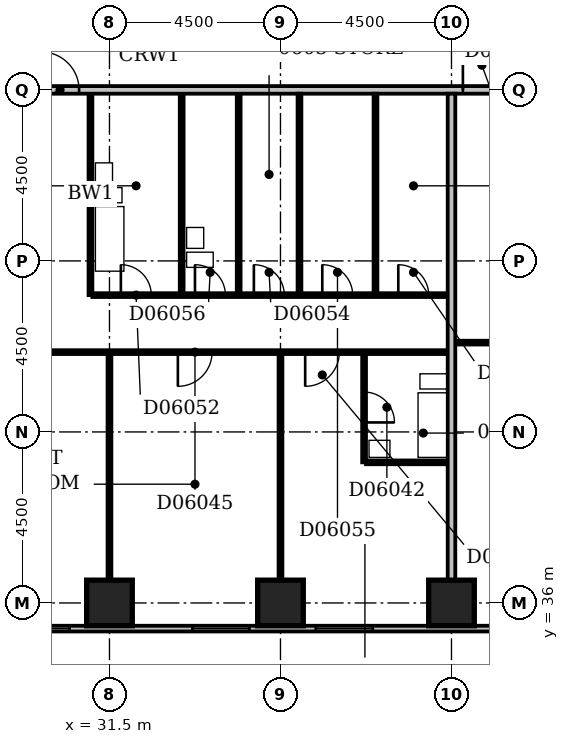
"""IFC4 building model, lengths in metres.
Left out: names, types, materials, properties, quantities, classifications, styles, units other than length and angle.
Written with IfcOpenShell. Run it as: python <this file> out.ifc"""

import sys

from ifc_helpers import new_model, si_unit, direction, frame, frame_2d, origin, origin_2d, place, context, subcontext, project, spatial, rectangle, extrude, element, fill, save


model = new_model("IFC4")
c1 = context("Model", 3, precision=1e-05, world=origin(), true_north=direction((0.0, 1.0)))
c2 = subcontext(c1, "Body", "Model", "MODEL_VIEW")
j1 = project(units=[si_unit("LENGTHUNIT", "METRE"), si_unit("PLANEANGLEUNIT", "RADIAN")], contexts=[c1])
p1 = place(None, origin())
s1 = spatial("IfcSite", under=j1, at=p1, CompositionType="ELEMENT")
p2 = place(p1, origin())
s2 = spatial("IfcBuilding", under=s1, at=p2, CompositionType="ELEMENT")
p3 = place(p2, frame((0.0, 0.0, 32.6)))
s3 = spatial("IfcBuildingStorey", under=s2, at=p3, CompositionType="ELEMENT", Elevation=32.6)
for number, where, z_axis, x_axis in (
    (1, (31.5, 36.0, -0.3), (0.0, 0.0, 1.0), (1.0, 0.0, 0.0)),
    (2, (36.0, 36.0, -0.3), (0.0, 0.0, 1.0), (1.0, 0.0, 0.0)),
    (3, (40.5, 36.0, -0.3), (0.0, 0.0, 1.0), (1.0, 0.0, 0.0)),
):
    element("IfcColumn", number, at=place(p3, frame(where, z_axis=z_axis, x_axis=x_axis)), inside=s3, PredefinedType="COLUMN", context=c2, shape_type="SweptSolid", body=[
        extrude(rectangle(XDim=1.2, YDim=1.2, at=origin_2d()), origin(), (0.0, 0.0, 1.0), 3.6),
    ])
p4 = place(p3, frame((23.1, 35.325, 0.0), z_axis=(0.0, 0.0, 1.0), x_axis=(1.0, 0.0, 0.0)))
e4 = element("IfcWall", 4, at=p4, inside=s3, PredefinedType="STANDARD", context=c2, shape_type="SweptSolid", body=[
    extrude(rectangle(XDim=45.15, YDim=0.15, at=frame_2d((22.575, 0.0))), origin(), (0.0, 0.0, 1.0), 2.7),
])
p5 = place(p4, frame((0.45, 0.0, 0.6)))
e5 = element("IfcOpeningElement", 5, at=p5, cuts=e4, PredefinedType="OPENING", context=c2, shape_type="SweptSolid", body=[
    extrude(rectangle(XDim=2.4, YDim=1.8, at=frame_2d((1.2, 0.9))), frame((0.0, 0.087, 0.0), z_axis=(0.0, -1.0, 0.0), x_axis=(1.0, 0.0, 0.0)), (0.0, 0.0, 1.0), 0.174),
])
p6 = place(p4, frame((4.95, 0.0, 0.6)))
e6 = element("IfcOpeningElement", 6, at=p6, cuts=e4, PredefinedType="OPENING", context=c2, shape_type="SweptSolid", body=[
    extrude(rectangle(XDim=2.4, YDim=1.8, at=frame_2d((1.2, 0.9))), frame((0.0, 0.087, 0.0), z_axis=(0.0, -1.0, 0.0), x_axis=(1.0, 0.0, 0.0)), (0.0, 0.0, 1.0), 0.174),
])
p7 = place(p4, frame((10.583, 0.0, 0.6)))
e7 = element("IfcOpeningElement", 7, at=p7, cuts=e4, PredefinedType="OPENING", context=c2, shape_type="SweptSolid", body=[
    extrude(rectangle(XDim=1.5, YDim=1.8, at=frame_2d((0.75, 0.9))), frame((0.0, 0.087, 0.0), z_axis=(0.0, -1.0, 0.0), x_axis=(1.0, 0.0, 0.0)), (0.0, 0.0, 1.0), 0.174),
])
p8 = place(p4, frame((13.83, 0.0, 0.6)))
e8 = element("IfcOpeningElement", 8, at=p8, cuts=e4, PredefinedType="OPENING", context=c2, shape_type="SweptSolid", body=[
    extrude(rectangle(XDim=1.5, YDim=1.8, at=frame_2d((0.75, 0.9))), frame((0.0, 0.087, 0.0), z_axis=(0.0, -1.0, 0.0), x_axis=(1.0, 0.0, 0.0)), (0.0, 0.0, 1.0), 0.174),
])
p9 = place(p4, frame((18.45, 0.0, 0.6)))
e9 = element("IfcOpeningElement", 9, at=p9, cuts=e4, PredefinedType="OPENING", context=c2, shape_type="SweptSolid", body=[
    extrude(rectangle(XDim=2.4, YDim=1.8, at=frame_2d((1.2, 0.9))), frame((0.0, 0.087, 0.0), z_axis=(0.0, -1.0, 0.0), x_axis=(1.0, 0.0, 0.0)), (0.0, 0.0, 1.0), 0.174),
])
p10 = place(p4, frame((22.95, 0.0, 0.6)))
e10 = element("IfcOpeningElement", 10, at=p10, cuts=e4, PredefinedType="OPENING", context=c2, shape_type="SweptSolid", body=[
    extrude(rectangle(XDim=2.4, YDim=1.8, at=frame_2d((1.2, 0.9))), frame((0.0, 0.087, 0.0), z_axis=(0.0, -1.0, 0.0), x_axis=(1.0, 0.0, 0.0)), (0.0, 0.0, 1.0), 0.174),
])
p11 = place(p4, frame((27.45, 0.0, 0.6)))
e11 = element("IfcOpeningElement", 11, at=p11, cuts=e4, PredefinedType="OPENING", context=c2, shape_type="SweptSolid", body=[
    extrude(rectangle(XDim=2.4, YDim=1.8, at=frame_2d((1.2, 0.9))), frame((0.0, 0.087, 0.0), z_axis=(0.0, -1.0, 0.0), x_axis=(1.0, 0.0, 0.0)), (0.0, 0.0, 1.0), 0.174),
])
p12 = place(p4, frame((31.95, 0.0, 0.6)))
e12 = element("IfcOpeningElement", 12, at=p12, cuts=e4, PredefinedType="OPENING", context=c2, shape_type="SweptSolid", body=[
    extrude(rectangle(XDim=2.4, YDim=1.8, at=frame_2d((1.2, 0.9))), frame((0.0, 0.087, 0.0), z_axis=(0.0, -1.0, 0.0), x_axis=(1.0, 0.0, 0.0)), (0.0, 0.0, 1.0), 0.174),
])
p13 = place(p4, frame((36.297, 0.0, 0.6)))
e13 = element("IfcOpeningElement", 13, at=p13, cuts=e4, PredefinedType="OPENING", context=c2, shape_type="SweptSolid", body=[
    extrude(rectangle(XDim=2.1, YDim=1.8, at=frame_2d((1.05, 0.9))), frame((0.0, 0.087, 0.0), z_axis=(0.0, -1.0, 0.0), x_axis=(1.0, 0.0, 0.0)), (0.0, 0.0, 1.0), 0.174),
])
p14 = place(p4, frame((40.95, 0.0, 0.6)))
e14 = element("IfcOpeningElement", 14, at=p14, cuts=e4, PredefinedType="OPENING", context=c2, shape_type="SweptSolid", body=[
    extrude(rectangle(XDim=2.4, YDim=1.8, at=frame_2d((1.2, 0.9))), frame((0.0, 0.087, 0.0), z_axis=(0.0, -1.0, 0.0), x_axis=(1.0, 0.0, 0.0)), (0.0, 0.0, 1.0), 0.174),
])
p15 = place(p3, frame((31.5, 36.6, 0.0), z_axis=(0.0, 0.0, 1.0), x_axis=(0.0, 1.0, 0.0)))
e15 = element("IfcWall", 15, at=p15, inside=s3, PredefinedType="PARTITIONING", context=c2, shape_type="SweptSolid", body=[
    extrude(rectangle(XDim=5.95, YDim=0.1, at=frame_2d((2.975, 0.0))), origin(), (0.0, 0.0, 1.0), 3.3),
])
p16 = place(p3, frame((36.0, 36.6, 0.0), z_axis=(0.0, 0.0, 1.0), x_axis=(0.0, 1.0, 0.0)))
e16 = element("IfcWall", 16, at=p16, inside=s3, PredefinedType="PARTITIONING", context=c2, shape_type="SweptSolid", body=[
    extrude(rectangle(XDim=5.95, YDim=0.1, at=frame_2d((2.975, 0.0))), origin(), (0.0, 0.0, 1.0), 2.4),
])
p17 = place(p3, frame((40.5, 36.6, 0.0), z_axis=(0.0, 0.0, 1.0), x_axis=(0.0, 1.0, 0.0)))
e17 = element("IfcWall", 17, at=p17, inside=s3, PredefinedType="PARTITIONING", context=c2, shape_type="SweptSolid", body=[
    extrude(rectangle(XDim=12.8, YDim=0.2, at=frame_2d((6.4, 0.0))), origin(), (0.0, 0.0, 1.0), 3.3),
])
p18 = place(p3, frame((38.2, 39.7, 0.0), z_axis=(0.0, 0.0, 1.0), x_axis=(0.0, 1.0, 0.0)))
e18 = element("IfcWall", 18, at=p18, inside=s3, PredefinedType="PLUMBINGWALL", context=c2, shape_type="SweptSolid", body=[
    extrude(rectangle(XDim=2.85, YDim=0.1, at=frame_2d((1.425, 0.0))), origin(), (0.0, 0.0, 1.0), 3.3),
])
p19 = place(p18, frame((1.05, 0.0, 0.0)))
e19 = element("IfcOpeningElement", 19, at=p19, cuts=e18, PredefinedType="OPENING", context=c2, shape_type="SweptSolid", body=[
    extrude(rectangle(XDim=0.8, YDim=2.1, at=frame_2d((0.4, 1.05))), frame((0.0, 0.062, 0.0), z_axis=(0.0, -1.0, 0.0), x_axis=(1.0, 0.0, 0.0)), (0.0, 0.0, 1.0), 0.124),
])
p20 = place(p3, frame((38.25, 39.7, 0.0), z_axis=(0.0, 0.0, 1.0), x_axis=(1.0, 0.0, 0.0)))
e20 = element("IfcWall", 20, at=p20, inside=s3, PredefinedType="PLUMBINGWALL", context=c2, shape_type="SweptSolid", body=[
    extrude(rectangle(XDim=2.15, YDim=0.1, at=frame_2d((1.075, 0.0))), origin(), (0.0, 0.0, 1.0), 3.3),
])
p21 = place(p3, frame((22.6, 42.6, 0.0), z_axis=(0.0, 0.0, 1.0), x_axis=(1.0, 0.0, 0.0)))
e21 = element("IfcWall", 21, at=p21, inside=s3, PredefinedType="PARTITIONING", context=c2, shape_type="SweptSolid", body=[
    extrude(rectangle(XDim=17.8, YDim=0.1, at=frame_2d((8.9, 0.0))), origin(), (0.0, 0.0, 1.0), 3.3),
])
p22 = place(p21, frame((3.9, 0.0, 0.0)))
e22 = element("IfcOpeningElement", 22, at=p22, cuts=e21, PredefinedType="OPENING", context=c2, shape_type="SweptSolid", body=[
    extrude(rectangle(XDim=0.9, YDim=2.1, at=frame_2d((0.45, 1.05))), frame((0.0, 0.062, 0.0), z_axis=(0.0, -1.0, 0.0), x_axis=(1.0, 0.0, 0.0)), (0.0, 0.0, 1.0), 0.124),
])
p23 = place(p21, frame((10.7, 0.0, 0.0)))
e23 = element("IfcOpeningElement", 23, at=p23, cuts=e21, PredefinedType="OPENING", context=c2, shape_type="SweptSolid", body=[
    extrude(rectangle(XDim=0.9, YDim=2.1, at=frame_2d((0.45, 1.05))), frame((0.0, 0.062, 0.0), z_axis=(0.0, -1.0, 0.0), x_axis=(1.0, 0.0, 0.0)), (0.0, 0.0, 1.0), 0.124),
])
p24 = place(p21, frame((14.05, 0.0, 0.0)))
e24 = element("IfcOpeningElement", 24, at=p24, cuts=e21, PredefinedType="OPENING", context=c2, shape_type="SweptSolid", body=[
    extrude(rectangle(XDim=0.9, YDim=2.1, at=frame_2d((0.45, 1.05))), frame((0.0, 0.062, 0.0), z_axis=(0.0, -1.0, 0.0), x_axis=(1.0, 0.0, 0.0)), (0.0, 0.0, 1.0), 0.124),
])
p25 = place(p3, frame((40.6, 42.85, 0.0), z_axis=(0.0, 0.0, 1.0), x_axis=(1.0, 0.0, 0.0)))
e25 = element("IfcWall", 25, at=p25, inside=s3, PredefinedType="PARTITIONING", context=c2, shape_type="SweptSolid", body=[
    extrude(rectangle(XDim=13.3, YDim=0.1, at=frame_2d((6.65, 0.0))), origin(), (0.0, 0.0, 1.0), 3.3),
])
p26 = place(p25, frame((3.9, 0.0, 0.0)))
e26 = element("IfcOpeningElement", 26, at=p26, cuts=e25, PredefinedType="OPENING", context=c2, shape_type="SweptSolid", body=[
    extrude(rectangle(XDim=0.9, YDim=2.1, at=frame_2d((0.45, 1.05))), frame((0.0, 0.062, 0.0), z_axis=(0.0, -1.0, 0.0), x_axis=(1.0, 0.0, 0.0)), (0.0, 0.0, 1.0), 0.124),
])
p27 = place(p25, frame((10.7, 0.0, 0.0)))
e27 = element("IfcOpeningElement", 27, at=p27, cuts=e25, PredefinedType="OPENING", context=c2, shape_type="SweptSolid", body=[
    extrude(rectangle(XDim=0.9, YDim=2.1, at=frame_2d((0.45, 1.05))), frame((0.0, 0.062, 0.0), z_axis=(0.0, -1.0, 0.0), x_axis=(1.0, 0.0, 0.0)), (0.0, 0.0, 1.0), 0.124),
])
p28 = place(p3, frame((31.0, 44.1, 0.0), z_axis=(0.0, 0.0, 1.0), x_axis=(0.0, 1.0, 0.0)))
e28 = element("IfcWall", 28, at=p28, inside=s3, PredefinedType="PLUMBINGWALL", context=c2, shape_type="SweptSolid", body=[
    extrude(rectangle(XDim=5.3, YDim=0.1, at=frame_2d((2.65, 0.0))), origin(), (0.0, 0.0, 1.0), 3.3),
])
p29 = place(p3, frame((31.05, 44.1, 0.0), z_axis=(0.0, 0.0, 1.0), x_axis=(1.0, 0.0, 0.0)))
e29 = element("IfcWall", 29, at=p29, inside=s3, PredefinedType="PARTITIONING", context=c2, shape_type="SweptSolid", body=[
    extrude(rectangle(XDim=9.35, YDim=0.1, at=frame_2d((4.675, 0.0))), origin(), (0.0, 0.0, 1.0), 3.3),
])
p30 = place(p29, frame((0.75, 0.0, 0.0)))
e30 = element("IfcOpeningElement", 30, at=p30, cuts=e29, PredefinedType="OPENING", context=c2, shape_type="SweptSolid", body=[
    extrude(rectangle(XDim=0.8, YDim=2.1, at=frame_2d((0.4, 1.05))), frame((0.0, 0.062, 0.0), z_axis=(0.0, -1.0, 0.0), x_axis=(1.0, 0.0, 0.0)), (0.0, 0.0, 1.0), 0.124),
])
p31 = place(p29, frame((8.05, 0.0, 0.0)))
e31 = element("IfcOpeningElement", 31, at=p31, cuts=e29, PredefinedType="OPENING", context=c2, shape_type="SweptSolid", body=[
    extrude(rectangle(XDim=0.8, YDim=2.1, at=frame_2d((0.4, 1.05))), frame((0.0, 0.062, 0.0), z_axis=(0.0, -1.0, 0.0), x_axis=(1.0, 0.0, 0.0)), (0.0, 0.0, 1.0), 0.124),
])
p32 = place(p29, frame((4.25, 0.0, 0.0)))
e32 = element("IfcOpeningElement", 32, at=p32, cuts=e29, PredefinedType="OPENING", context=c2, shape_type="SweptSolid", body=[
    extrude(rectangle(XDim=0.8, YDim=2.1, at=frame_2d((0.4, 1.05))), frame((0.0, 0.062, 0.0), z_axis=(0.0, -1.0, 0.0), x_axis=(1.0, 0.0, 0.0)), (0.0, 0.0, 1.0), 0.124),
])
p33 = place(p29, frame((6.05, 0.0, 0.0)))
e33 = element("IfcOpeningElement", 33, at=p33, cuts=e29, PredefinedType="OPENING", context=c2, shape_type="SweptSolid", body=[
    extrude(rectangle(XDim=0.8, YDim=2.1, at=frame_2d((0.4, 1.05))), frame((0.0, 0.062, 0.0), z_axis=(0.0, -1.0, 0.0), x_axis=(1.0, 0.0, 0.0)), (0.0, 0.0, 1.0), 0.124),
])
p34 = place(p29, frame((2.7, 0.0, 0.0)))
e34 = element("IfcOpeningElement", 34, at=p34, cuts=e29, PredefinedType="OPENING", context=c2, shape_type="SweptSolid", body=[
    extrude(rectangle(XDim=0.8, YDim=2.1, at=frame_2d((0.4, 1.05))), frame((0.0, 0.062, 0.0), z_axis=(0.0, -1.0, 0.0), x_axis=(1.0, 0.0, 0.0)), (0.0, 0.0, 1.0), 0.124),
])
for number, where, z_axis, x_axis in (
    (35, (33.4, 44.15, 0.0), (0.0, 0.0, 1.0), (0.0, 1.0, 0.0)),
    (36, (34.9, 44.15, 0.0), (0.0, 0.0, 1.0), (0.0, 1.0, 0.0)),
):
    element("IfcWall", number, at=place(p3, frame(where, z_axis=z_axis, x_axis=x_axis)), inside=s3, PredefinedType="PLUMBINGWALL", context=c2, shape_type="SweptSolid", body=[
        extrude(rectangle(XDim=5.25, YDim=0.1, at=frame_2d((2.625, 0.0))), origin(), (0.0, 0.0, 1.0), 3.3),
    ])
p35 = place(p3, frame((36.5, 44.15, 0.0), z_axis=(0.0, 0.0, 1.0), x_axis=(0.0, 1.0, 0.0)))
e37 = element("IfcWall", 37, at=p35, inside=s3, PredefinedType="PARTITIONING", context=c2, shape_type="SweptSolid", body=[
    extrude(rectangle(XDim=5.25, YDim=0.1, at=frame_2d((2.625, 0.0))), origin(), (0.0, 0.0, 1.0), 2.4),
])
p36 = place(p3, frame((38.5, 44.15, 0.0), z_axis=(0.0, 0.0, 1.0), x_axis=(0.0, 1.0, 0.0)))
e38 = element("IfcWall", 38, at=p36, inside=s3, PredefinedType="PARTITIONING", context=c2, shape_type="SweptSolid", body=[
    extrude(rectangle(XDim=5.25, YDim=0.1, at=frame_2d((2.625, 0.0))), origin(), (0.0, 0.0, 1.0), 3.3),
])
p37 = place(p3, frame((9.1, 49.5, 0.0), z_axis=(0.0, 0.0, 1.0), x_axis=(1.0, 0.0, 0.0)))
e39 = element("IfcWall", 39, at=p37, inside=s3, PredefinedType="PARTITIONING", context=c2, shape_type="SweptSolid", body=[
    extrude(rectangle(XDim=57.8, YDim=0.2, at=frame_2d((28.9, 0.0))), origin(), (0.0, 0.0, 1.0), 3.3),
])
p38 = place(p37, frame((20.6, 0.0, 0.0)))
e40 = element("IfcOpeningElement", 40, at=p38, cuts=e39, PredefinedType="OPENING", context=c2, shape_type="SweptSolid", body=[
    extrude(rectangle(XDim=1.0, YDim=2.1, at=frame_2d((0.5, 1.05))), frame((0.0, 0.112, 0.0), z_axis=(0.0, -1.0, 0.0), x_axis=(1.0, 0.0, 0.0)), (0.0, 0.0, 1.0), 0.224),
])
p39 = place(p37, frame((31.7, 0.0, 0.0)))
e41 = element("IfcOpeningElement", 41, at=p39, cuts=e39, PredefinedType="OPENING", context=c2, shape_type="SweptSolid", body=[
    extrude(rectangle(XDim=1.0, YDim=2.1, at=frame_2d((0.5, 1.05))), frame((0.0, 0.112, 0.0), z_axis=(0.0, -1.0, 0.0), x_axis=(1.0, 0.0, 0.0)), (0.0, 0.0, 1.0), 0.224),
])
p40 = place(p37, frame((47.6, 0.0, 0.0)))
e42 = element("IfcOpeningElement", 42, at=p40, cuts=e39, PredefinedType="OPENING", context=c2, shape_type="SweptSolid", body=[
    extrude(rectangle(XDim=1.0, YDim=2.1, at=frame_2d((0.5, 1.05))), frame((0.0, 0.112, 0.0), z_axis=(0.0, -1.0, 0.0), x_axis=(1.0, 0.0, 0.0)), (0.0, 0.0, 1.0), 0.224),
])
p41 = place(p37, frame((54.15, 0.0, 0.0)))
e43 = element("IfcOpeningElement", 43, at=p41, cuts=e39, PredefinedType="OPENING", context=c2, shape_type="SweptSolid", body=[
    extrude(rectangle(XDim=1.0, YDim=2.1, at=frame_2d((0.5, 1.05))), frame((0.0, 0.112, 0.0), z_axis=(0.0, -1.0, 0.0), x_axis=(1.0, 0.0, 0.0)), (0.0, 0.0, 1.0), 0.224),
])
p42 = place(p37, frame((10.65, 0.0, 0.0)))
e44 = element("IfcOpeningElement", 44, at=p42, cuts=e39, PredefinedType="OPENING", context=c2, shape_type="SweptSolid", body=[
    extrude(rectangle(XDim=0.9, YDim=2.1, at=frame_2d((0.45, 1.05))), frame((0.0, 0.112, 0.0), z_axis=(0.0, -1.0, 0.0), x_axis=(1.0, 0.0, 0.0)), (0.0, 0.0, 1.0), 0.224),
])
p43 = place(p6, origin())
e45 = element("IfcWindow", 45, at=p43, inside=s3, PartitioningType="SINGLE_PANEL", PredefinedType="WINDOW", context=c2, shape_type="SweptSolid", body=[
    extrude(rectangle(XDim=2.4, YDim=1.8, at=frame_2d((1.2, 0.9))), frame((0.0, 0.03, 0.0), z_axis=(0.0, -1.0, 0.0), x_axis=(1.0, 0.0, 0.0)), (0.0, 0.0, 1.0), 0.06),
])
fill(e6, e45)
p44 = place(p7, origin())
e46 = element("IfcWindow", 46, at=p44, inside=s3, PartitioningType="SINGLE_PANEL", PredefinedType="WINDOW", context=c2, shape_type="SweptSolid", body=[
    extrude(rectangle(XDim=1.5, YDim=1.8, at=frame_2d((0.75, 0.9))), frame((0.0, 0.03, 0.0), z_axis=(0.0, -1.0, 0.0), x_axis=(1.0, 0.0, 0.0)), (0.0, 0.0, 1.0), 0.06),
])
fill(e7, e46)
p45 = place(p8, origin())
e47 = element("IfcWindow", 47, at=p45, inside=s3, PartitioningType="SINGLE_PANEL", PredefinedType="WINDOW", context=c2, shape_type="SweptSolid", body=[
    extrude(rectangle(XDim=1.5, YDim=1.8, at=frame_2d((0.75, 0.9))), frame((0.0, 0.03, 0.0), z_axis=(0.0, -1.0, 0.0), x_axis=(1.0, 0.0, 0.0)), (0.0, 0.0, 1.0), 0.06),
])
fill(e8, e47)
p46 = place(p19, frame((0.8, 0.0, 0.0), z_axis=(0.0, 0.0, 1.0), x_axis=(-1.0, 0.0, 0.0)))
e48 = element("IfcDoor", 48, at=p46, inside=s3, OperationType="SINGLE_SWING_RIGHT", PredefinedType="DOOR", context=c2, shape_type="SweptSolid", body=[
    extrude(rectangle(XDim=0.8, YDim=2.1, at=frame_2d((0.4, 1.05))), frame((0.0, 0.025, 0.0), z_axis=(0.0, -1.0, 0.0), x_axis=(1.0, 0.0, 0.0)), (0.0, 0.0, 1.0), 0.05),
])
fill(e19, e48)
p47 = place(p23, frame((0.9, 0.0, 0.0), z_axis=(0.0, 0.0, 1.0), x_axis=(-1.0, 0.0, 0.0)))
e49 = element("IfcDoor", 49, at=p47, inside=s3, OperationType="SINGLE_SWING_RIGHT", PredefinedType="DOOR", context=c2, shape_type="SweptSolid", body=[
    extrude(rectangle(XDim=0.9, YDim=2.1, at=frame_2d((0.45, 1.05))), frame((0.0, 0.025, 0.0), z_axis=(0.0, -1.0, 0.0), x_axis=(1.0, 0.0, 0.0)), (0.0, 0.0, 1.0), 0.05),
])
fill(e23, e49)
p48 = place(p24, frame((0.9, 0.0, 0.0), z_axis=(0.0, 0.0, 1.0), x_axis=(-1.0, 0.0, 0.0)))
e50 = element("IfcDoor", 50, at=p48, inside=s3, OperationType="SINGLE_SWING_RIGHT", PredefinedType="DOOR", context=c2, shape_type="SweptSolid", body=[
    extrude(rectangle(XDim=0.9, YDim=2.1, at=frame_2d((0.45, 1.05))), frame((0.0, 0.025, 0.0), z_axis=(0.0, -1.0, 0.0), x_axis=(1.0, 0.0, 0.0)), (0.0, 0.0, 1.0), 0.05),
])
fill(e24, e50)
p49 = place(p30, origin())
e51 = element("IfcDoor", 51, at=p49, inside=s3, OperationType="SINGLE_SWING_LEFT", PredefinedType="DOOR", context=c2, shape_type="SweptSolid", body=[
    extrude(rectangle(XDim=0.8, YDim=2.1, at=frame_2d((0.4, 1.05))), frame((0.0, 0.025, 0.0), z_axis=(0.0, -1.0, 0.0), x_axis=(1.0, 0.0, 0.0)), (0.0, 0.0, 1.0), 0.05),
])
fill(e30, e51)
p50 = place(p31, origin())
e52 = element("IfcDoor", 52, at=p50, inside=s3, OperationType="SINGLE_SWING_LEFT", PredefinedType="DOOR", context=c2, shape_type="SweptSolid", body=[
    extrude(rectangle(XDim=0.8, YDim=2.1, at=frame_2d((0.4, 1.05))), frame((0.0, 0.025, 0.0), z_axis=(0.0, -1.0, 0.0), x_axis=(1.0, 0.0, 0.0)), (0.0, 0.0, 1.0), 0.05),
])
fill(e31, e52)
p51 = place(p32, origin())
e53 = element("IfcDoor", 53, at=p51, inside=s3, OperationType="SINGLE_SWING_LEFT", PredefinedType="DOOR", context=c2, shape_type="SweptSolid", body=[
    extrude(rectangle(XDim=0.8, YDim=2.1, at=frame_2d((0.4, 1.05))), frame((0.0, 0.025, 0.0), z_axis=(0.0, -1.0, 0.0), x_axis=(1.0, 0.0, 0.0)), (0.0, 0.0, 1.0), 0.05),
])
fill(e32, e53)
p52 = place(p33, origin())
e54 = element("IfcDoor", 54, at=p52, inside=s3, OperationType="SINGLE_SWING_LEFT", PredefinedType="DOOR", context=c2, shape_type="SweptSolid", body=[
    extrude(rectangle(XDim=0.8, YDim=2.1, at=frame_2d((0.4, 1.05))), frame((0.0, 0.025, 0.0), z_axis=(0.0, -1.0, 0.0), x_axis=(1.0, 0.0, 0.0)), (0.0, 0.0, 1.0), 0.05),
])
fill(e33, e54)
p53 = place(p34, origin())
e55 = element("IfcDoor", 55, at=p53, inside=s3, OperationType="SINGLE_SWING_LEFT", PredefinedType="DOOR", context=c2, shape_type="SweptSolid", body=[
    extrude(rectangle(XDim=0.8, YDim=2.1, at=frame_2d((0.4, 1.05))), frame((0.0, 0.025, 0.0), z_axis=(0.0, -1.0, 0.0), x_axis=(1.0, 0.0, 0.0)), (0.0, 0.0, 1.0), 0.05),
])
fill(e34, e55)
p54 = place(p38, origin())
e56 = element("IfcDoor", 56, at=p54, inside=s3, OperationType="SINGLE_SWING_LEFT", PredefinedType="DOOR", context=c2, shape_type="SweptSolid", body=[
    extrude(rectangle(XDim=1.0, YDim=2.1, at=frame_2d((0.5, 1.05))), frame((0.0, 0.025, 0.0), z_axis=(0.0, -1.0, 0.0), x_axis=(1.0, 0.0, 0.0)), (0.0, 0.0, 1.0), 0.05),
])
fill(e40, e56)
p55 = place(p39, origin())
e57 = element("IfcDoor", 57, at=p55, inside=s3, OperationType="SINGLE_SWING_LEFT", PredefinedType="DOOR", context=c2, shape_type="SweptSolid", body=[
    extrude(rectangle(XDim=1.0, YDim=2.1, at=frame_2d((0.5, 1.05))), frame((0.0, 0.025, 0.0), z_axis=(0.0, -1.0, 0.0), x_axis=(1.0, 0.0, 0.0)), (0.0, 0.0, 1.0), 0.05),
])
fill(e41, e57)
save(model, sys.argv[1])
